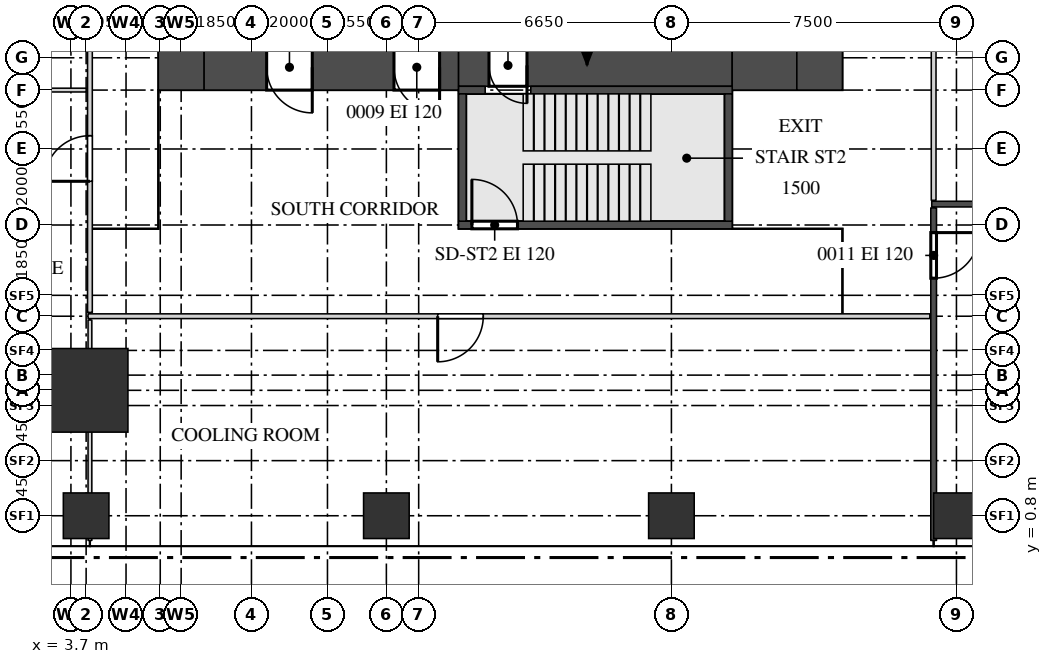
"""IFC4 building model, lengths in metres.
Left out: names, types, materials, properties, quantities, classifications, styles, units other than length and angle.
Written with IfcOpenShell. Run it as: python <this file> out.ifc"""

import sys

from ifc_helpers import new_model, si_unit, direction, frame, frame_2d, origin, origin_2d, place, context, subcontext, project, spatial, rectangle, extrude, source, transform, mapped, element, fill, save


model = new_model("IFC4")
c1 = context("Model", 3, precision=1e-05, world=origin(), true_north=direction((0.0, 1.0)))
c2 = subcontext(c1, "Body", "Model", "MODEL_VIEW")
j1 = project(units=[si_unit("LENGTHUNIT", "METRE"), si_unit("PLANEANGLEUNIT", "RADIAN")], contexts=[c1])
p1 = place(None, origin())
s1 = spatial("IfcSite", under=j1, at=p1, CompositionType="ELEMENT")
p2 = place(p1, origin())
s2 = spatial("IfcBuilding", under=s1, at=p2, CompositionType="ELEMENT")
p3 = place(p2, frame((0.0, 0.0, 73.5)))
s3 = spatial("IfcBuildingStorey", under=s2, at=p3, CompositionType="ELEMENT", Elevation=73.5)
m1 = source(origin(), c2, "Body", "SweptSolid", [
    extrude(rectangle(XDim=6.7, YDim=1.2, at=frame_2d((3.35, 0.0))), origin(), (0.0, 0.0, 1.0), 4.2),
])
p4 = place(p3, frame((7.2, 12.6, 0.0), z_axis=(0.0, 0.0, 1.0), x_axis=(1.0, 0.0, 0.0)))
e1 = element("IfcWall", 1, at=p4, inside=s3, PredefinedType="SHEAR", context=c2, shape_type="MappedRepresentation", body=[
    mapped(m1, transform((0.0, 0.0, 0.0))),
])
m2 = source(origin(), c2, "Body", "SweptSolid", [
    extrude(rectangle(XDim=1.2, YDim=2.1, at=frame_2d((0.6, 1.05))), frame((0.0, 0.61, 0.0), z_axis=(0.0, -1.0, 0.0), x_axis=(1.0, 0.0, 0.0)), (0.0, 0.0, 1.0), 1.22),
])
p5 = place(p4, frame((5.0, 0.0, 0.0)))
e2 = element("IfcOpeningElement", 2, at=p5, cuts=e1, PredefinedType="OPENING", context=c2, shape_type="MappedRepresentation", body=[
    mapped(m2, transform((0.0, 0.0, 0.0))),
])
p6 = place(p4, frame((1.65, 0.0, 0.0)))
e3 = element("IfcOpeningElement", 3, at=p6, cuts=e1, PredefinedType="OPENING", context=c2, shape_type="MappedRepresentation", body=[
    mapped(m2, transform((0.0, 0.0, 0.0))),
])
m3 = source(origin(), c2, "Body", "SweptSolid", [
    extrude(rectangle(XDim=7.2, YDim=1.1, at=frame_2d((3.6, 0.0))), origin(), (0.0, 0.0, 1.0), 4.2),
])
p7 = place(p3, frame((13.9, 12.65, 0.0), z_axis=(0.0, 0.0, 1.0), x_axis=(1.0, 0.0, 0.0)))
e4 = element("IfcWall", 4, at=p7, inside=s3, PredefinedType="SHEAR", context=c2, shape_type="MappedRepresentation", body=[
    mapped(m3, transform((0.0, 0.0, 0.0))),
])
m4 = source(origin(), c2, "Body", "SweptSolid", [
    extrude(rectangle(XDim=1.0, YDim=2.1, at=frame_2d((0.5, 1.05))), frame((0.0, 0.56, 0.0), z_axis=(0.0, -1.0, 0.0), x_axis=(1.0, 0.0, 0.0)), (0.0, 0.0, 1.0), 1.12),
])
p8 = place(p7, frame((0.8, 0.0, 0.0)))
e5 = element("IfcOpeningElement", 5, at=p8, cuts=e4, PredefinedType="OPENING", context=c2, shape_type="MappedRepresentation", body=[
    mapped(m4, transform((0.0, 0.0, 0.0))),
])
m5 = source(origin(), c2, "Body", "SweptSolid", [
    extrude(rectangle(XDim=1.7, YDim=1.2, at=frame_2d((0.85, 0.0))), origin(), (0.0, 0.0, 1.0), 4.2),
])
p9 = place(p3, frame((21.1, 12.6, 0.0), z_axis=(0.0, 0.0, 1.0), x_axis=(1.0, 0.0, 0.0)))
e6 = element("IfcWall", 6, at=p9, inside=s3, PredefinedType="SHEAR", context=c2, shape_type="MappedRepresentation", body=[
    mapped(m5, transform((0.0, 0.0, 0.0))),
])
m6 = source(origin(), c2, "Body", "SweptSolid", [
    extrude(rectangle(XDim=1.2, YDim=1.2, at=frame_2d((0.6, 0.0))), origin(), (0.0, 0.0, 1.0), 4.2),
])
for number, where, z_axis, x_axis in (
    (7, (22.8, 12.6, 0.0), (0.0, 0.0, 1.0), (1.0, 0.0, 0.0)),
    (8, (6.0, 12.6, 0.0), (0.0, 0.0, 1.0), (1.0, 0.0, 0.0)),
):
    element("IfcWall", number, at=place(p3, frame(where, z_axis=z_axis, x_axis=x_axis)), inside=s3, PredefinedType="SHEAR", context=c2, shape_type="MappedRepresentation", body=[
        mapped(m6, transform((0.0, 0.0, 0.0))),
    ])
m7 = source(origin(), c2, "Body", "SweptSolid", [
    extrude(rectangle(XDim=0.7, YDim=0.2, at=frame_2d((0.35, 0.0))), origin(), (0.0, 0.0, 1.0), 4.2),
])
p10 = place(p3, frame((13.9, 12.0, 0.0), z_axis=(0.0, 0.0, 1.0), x_axis=(1.0, 0.0, 0.0)))
e9 = element("IfcWall", 9, at=p10, inside=s3, PredefinedType="SHEAR", context=c2, shape_type="MappedRepresentation", body=[
    mapped(m7, transform((0.0, 0.0, 0.0))),
])
m8 = source(origin(), c2, "Body", "SweptSolid", [
    extrude(rectangle(XDim=5.3, YDim=0.2, at=frame_2d((2.65, 0.0))), origin(), (0.0, 0.0, 1.0), 4.2),
])
p11 = place(p3, frame((15.8, 12.0, 0.0), z_axis=(0.0, 0.0, 1.0), x_axis=(1.0, 0.0, 0.0)))
e10 = element("IfcWall", 10, at=p11, inside=s3, PredefinedType="SHEAR", context=c2, shape_type="MappedRepresentation", body=[
    mapped(m8, transform((0.0, 0.0, 0.0))),
])
m9 = source(origin(), c2, "Body", "SweptSolid", [
    extrude(rectangle(XDim=7.2, YDim=0.2, at=frame_2d((3.6, 0.0))), origin(), (0.0, 0.0, 1.0), 4.2),
])
p12 = place(p3, frame((13.9, 8.45, 0.0), z_axis=(0.0, 0.0, 1.0), x_axis=(1.0, 0.0, 0.0)))
e11 = element("IfcWall", 11, at=p12, inside=s3, PredefinedType="SHEAR", context=c2, shape_type="MappedRepresentation", body=[
    mapped(m9, transform((0.0, 0.0, 0.0))),
])
m10 = source(origin(), c2, "Body", "SweptSolid", [
    extrude(rectangle(XDim=1.2, YDim=2.1, at=frame_2d((0.6, 1.05))), frame((0.0, 0.11, 0.0), z_axis=(0.0, -1.0, 0.0), x_axis=(1.0, 0.0, 0.0)), (0.0, 0.0, 1.0), 0.22),
])
p13 = place(p12, frame((0.35, 0.0, 0.0)))
e12 = element("IfcOpeningElement", 12, at=p13, cuts=e11, PredefinedType="OPENING", context=c2, shape_type="MappedRepresentation", body=[
    mapped(m10, transform((0.0, 0.0, 0.0))),
])
m11 = source(origin(), c2, "Body", "SweptSolid", [
    extrude(rectangle(XDim=3.35, YDim=0.2, at=frame_2d((1.675, 0.0))), origin(), (0.0, 0.0, 1.0), 4.2),
])
for number, where, z_axis, x_axis in (
    (13, (21.0, 8.55, 0.0), (0.0, 0.0, 1.0), (0.0, 1.0, 0.0)),
    (14, (14.0, 8.55, 0.0), (0.0, 0.0, 1.0), (0.0, 1.0, 0.0)),
):
    element("IfcWall", number, at=place(p3, frame(where, z_axis=z_axis, x_axis=x_axis)), inside=s3, PredefinedType="SHEAR", context=c2, shape_type="MappedRepresentation", body=[
        mapped(m11, transform((0.0, 0.0, 0.0))),
    ])
m12 = source(origin(), c2, "Body", "SweptSolid", [
    extrude(rectangle(XDim=2.2, YDim=2.2, at=origin_2d()), origin(), (0.0, 0.0, 1.0), 4.5),
])
p14 = place(p3, frame((4.1, 4.1, 0.0), z_axis=(0.0, 0.0, 1.0), x_axis=(1.0, 0.0, 0.0)))
e15 = element("IfcColumn", 15, at=p14, inside=s3, PredefinedType="COLUMN", context=c2, shape_type="MappedRepresentation", body=[
    mapped(m12, transform((0.0, 0.0, 0.0))),
])
m13 = source(origin(), c2, "Body", "SweptSolid", [
    extrude(rectangle(XDim=1.2, YDim=1.2, at=origin_2d()), origin(), (0.0, 0.0, 1.0), 4.2),
])
for number, where, z_axis, x_axis in (
    (16, (4.1, 0.8, 0.0), (0.0, 0.0, 1.0), (1.0, 0.0, 0.0)),
    (17, (12.0, 0.8, 0.0), (0.0, 0.0, 1.0), (1.0, 0.0, 0.0)),
    (18, (19.5, 0.8, 0.0), (0.0, 0.0, 1.0), (1.0, 0.0, 0.0)),
    (19, (27.0, 0.8, 0.0), (0.0, 0.0, 1.0), (1.0, 0.0, 0.0)),
):
    element("IfcColumn", number, at=place(p3, frame(where, z_axis=z_axis, x_axis=x_axis)), inside=s3, PredefinedType="COLUMN", context=c2, shape_type="MappedRepresentation", body=[
        mapped(m13, transform((0.0, 0.0, 0.0))),
    ])
m14 = source(origin(), c2, "Body", "SweptSolid", [
    extrude(rectangle(XDim=5.8, YDim=0.1, at=frame_2d((2.9, 0.0))), origin(), (0.0, 0.0, 1.0), 3.6),
])
p15 = place(p3, frame((4.2, 0.15, 0.0), z_axis=(0.0, 0.0, 1.0), x_axis=(0.0, 1.0, 0.0)))
e20 = element("IfcWall", 20, at=p15, inside=s3, PredefinedType="PARTITIONING", context=c2, shape_type="MappedRepresentation", body=[
    mapped(m14, transform((0.0, 0.0, 0.0))),
])
m15 = source(origin(), c2, "Body", "SweptSolid", [
    extrude(rectangle(XDim=8.75, YDim=0.15, at=frame_2d((4.375, 0.0))), origin(), (0.0, 0.0, 1.0), 4.3),
])
p16 = place(p3, frame((26.4, 0.15, 0.0), z_axis=(0.0, 0.0, 1.0), x_axis=(0.0, 1.0, 0.0)))
e21 = element("IfcWall", 21, at=p16, inside=s3, PredefinedType="PARTITIONING", context=c2, shape_type="MappedRepresentation", body=[
    mapped(m15, transform((0.0, 0.0, 0.0))),
])
m16 = source(origin(), c2, "Body", "SweptSolid", [
    extrude(rectangle(XDim=1.2, YDim=2.1, at=frame_2d((0.6, 1.05))), frame((0.0, 0.085, 0.0), z_axis=(0.0, -1.0, 0.0), x_axis=(1.0, 0.0, 0.0)), (0.0, 0.0, 1.0), 0.17),
])
p17 = place(p16, frame((6.9, 0.0, 0.0)))
e22 = element("IfcOpeningElement", 22, at=p17, cuts=e21, PredefinedType="OPENING", context=c2, shape_type="MappedRepresentation", body=[
    mapped(m16, transform((0.0, 0.0, 0.0))),
])
m17 = source(origin(), c2, "Body", "SweptSolid", [
    extrude(rectangle(XDim=22.15, YDim=0.125, at=frame_2d((11.075, 0.0))), origin(), (0.0, 0.0, 1.0), 4.3),
])
p18 = place(p3, frame((4.15, 6.05, 0.0), z_axis=(0.0, 0.0, 1.0), x_axis=(1.0, 0.0, 0.0)))
e23 = element("IfcWall", 23, at=p18, inside=s3, PredefinedType="PARTITIONING", context=c2, shape_type="MappedRepresentation", body=[
    mapped(m17, transform((0.0, 0.0, 0.0))),
])
m18 = source(origin(), c2, "Body", "SweptSolid", [
    extrude(rectangle(XDim=1.2, YDim=2.1, at=frame_2d((0.6, 1.05))), frame((0.0, 0.073, 0.0), z_axis=(0.0, -1.0, 0.0), x_axis=(1.0, 0.0, 0.0)), (0.0, 0.0, 1.0), 0.145),
])
p19 = place(p18, frame((9.2, 0.0, 0.0)))
e24 = element("IfcOpeningElement", 24, at=p19, cuts=e23, PredefinedType="OPENING", context=c2, shape_type="MappedRepresentation", body=[
    mapped(m18, transform((0.0, 0.0, 0.0))),
])
m19 = source(origin(), c2, "Body", "SweptSolid", [
    extrude(rectangle(XDim=41.8, YDim=0.125, at=frame_2d((20.9, 0.0))), origin(), (0.0, 0.0, 1.0), 4.3),
])
p20 = place(p3, frame((4.2, 6.15, 0.0), z_axis=(0.0, 0.0, 1.0), x_axis=(0.0, 1.0, 0.0)))
e25 = element("IfcWall", 25, at=p20, inside=s3, PredefinedType="PARTITIONING", context=c2, shape_type="MappedRepresentation", body=[
    mapped(m19, transform((0.0, 0.0, 0.0))),
])
p21 = place(p20, frame((3.45, 0.0, 0.0)))
e26 = element("IfcOpeningElement", 26, at=p21, cuts=e25, PredefinedType="OPENING", context=c2, shape_type="MappedRepresentation", body=[
    mapped(m18, transform((0.0, 0.0, 0.0))),
])
m20 = source(origin(), c2, "Body", "SweptSolid", [
    extrude(rectangle(XDim=0.9, YDim=2.1, at=frame_2d((0.45, 1.05))), frame((0.0, 0.073, 0.0), z_axis=(0.0, -1.0, 0.0), x_axis=(1.0, 0.0, 0.0)), (0.0, 0.0, 1.0), 0.145),
])
p22 = place(p20, frame((13.25, 0.0, 0.0)))
e27 = element("IfcOpeningElement", 27, at=p22, cuts=e25, PredefinedType="OPENING", context=c2, shape_type="MappedRepresentation", body=[
    mapped(m20, transform((0.0, 0.0, 0.0))),
])
p23 = place(p20, frame((30.35, 0.0, 0.0)))
e28 = element("IfcOpeningElement", 28, at=p23, cuts=e25, PredefinedType="OPENING", context=c2, shape_type="MappedRepresentation", body=[
    mapped(m20, transform((0.0, 0.0, 0.0))),
])
m21 = source(origin(), c2, "Body", "SweptSolid", [
    extrude(rectangle(XDim=27.5, YDim=0.15, at=frame_2d((13.75, 0.0))), origin(), (0.0, 0.0, 1.0), 4.3),
])
p24 = place(p3, frame((26.35, 9.0, 0.0), z_axis=(0.0, 0.0, 1.0), x_axis=(1.0, 0.0, 0.0)))
e29 = element("IfcWall", 29, at=p24, inside=s3, PredefinedType="PARTITIONING", context=c2, shape_type="MappedRepresentation", body=[
    mapped(m21, transform((0.0, 0.0, 0.0))),
])
m22 = source(origin(), c2, "Body", "SweptSolid", [
    extrude(rectangle(XDim=26.1, YDim=0.125, at=frame_2d((13.05, 0.0))), origin(), (0.0, 0.0, 1.0), 4.3),
])
p25 = place(p3, frame((26.4, 9.1, 0.0), z_axis=(0.0, 0.0, 1.0), x_axis=(0.0, 1.0, 0.0)))
e30 = element("IfcWall", 30, at=p25, inside=s3, PredefinedType="PARTITIONING", context=c2, shape_type="MappedRepresentation", body=[
    mapped(m22, transform((0.0, 0.0, 0.0))),
])
p26 = place(p25, frame((5.8, 0.0, 0.0)))
e31 = element("IfcOpeningElement", 31, at=p26, cuts=e30, PredefinedType="OPENING", context=c2, shape_type="MappedRepresentation", body=[
    mapped(m18, transform((0.0, 0.0, 0.0))),
])
m23 = source(origin(), c2, "Body", "SweptSolid", [
    extrude(rectangle(XDim=3.95, YDim=0.1, at=frame_2d((1.975, 0.0))), origin(), (0.0, 0.0, 1.0), 4.3),
])
p27 = place(p3, frame((0.15, 12.0, 0.0), z_axis=(0.0, 0.0, 1.0), x_axis=(1.0, 0.0, 0.0)))
e32 = element("IfcWall", 32, at=p27, inside=s3, PredefinedType="PARTITIONING", context=c2, shape_type="MappedRepresentation", body=[
    mapped(m23, transform((0.0, 0.0, 0.0))),
])
m24 = source(origin(), c2, "Body", "SweptSolid", [
    extrude(rectangle(XDim=1.2, YDim=2.1, at=frame_2d((0.6, 1.05))), frame((0.0, 0.55, 0.0), z_axis=(0.0, -1.0, 0.0), x_axis=(1.0, 0.0, 0.0)), (0.0, 0.0, 1.0), 1.1),
])
p28 = place(p5, origin())
e33 = element("IfcDoor", 33, at=p28, inside=s3, OperationType="SINGLE_SWING_RIGHT", PredefinedType="DOOR", context=c2, shape_type="MappedRepresentation", body=[
    mapped(m24, transform((0.0, 0.0, 0.0))),
])
fill(e2, e33)
p29 = place(p6, origin())
e34 = element("IfcDoor", 34, at=p29, inside=s3, OperationType="SINGLE_SWING_RIGHT", PredefinedType="DOOR", context=c2, shape_type="MappedRepresentation", body=[
    mapped(m24, transform((0.0, 0.0, 0.0))),
])
fill(e3, e34)
m25 = source(origin(), c2, "Body", "SweptSolid", [
    extrude(rectangle(XDim=1.0, YDim=2.1, at=frame_2d((0.5, 1.05))), frame((0.0, 0.5, 0.0), z_axis=(0.0, -1.0, 0.0), x_axis=(1.0, 0.0, 0.0)), (0.0, 0.0, 1.0), 1.0),
])
p30 = place(p8, origin())
e35 = element("IfcDoor", 35, at=p30, inside=s3, OperationType="SINGLE_SWING_RIGHT", PredefinedType="DOOR", context=c2, shape_type="MappedRepresentation", body=[
    mapped(m25, transform((0.0, 0.0, 0.0))),
])
fill(e5, e35)
m26 = source(origin(), c2, "Body", "SweptSolid", [
    extrude(rectangle(XDim=1.2, YDim=2.1, at=frame_2d((0.6, 1.05))), frame((0.0, 0.025, 0.0), z_axis=(0.0, -1.0, 0.0), x_axis=(1.0, 0.0, 0.0)), (0.0, 0.0, 1.0), 0.05),
])
p31 = place(p17, origin())
e36 = element("IfcDoor", 36, at=p31, inside=s3, OperationType="SINGLE_SWING_RIGHT", PredefinedType="DOOR", context=c2, shape_type="MappedRepresentation", body=[
    mapped(m26, transform((0.0, 0.0, 0.0))),
])
fill(e22, e36)
p32 = place(p21, origin())
e37 = element("IfcDoor", 37, at=p32, inside=s3, OperationType="SINGLE_SWING_RIGHT", PredefinedType="DOOR", context=c2, shape_type="MappedRepresentation", body=[
    mapped(m26, transform((0.0, 0.0, 0.0))),
])
fill(e26, e37)
p33 = place(p19, origin())
e38 = element("IfcDoor", 38, at=p33, inside=s3, OperationType="SINGLE_SWING_LEFT", PredefinedType="DOOR", context=c2, shape_type="MappedRepresentation", body=[
    mapped(m26, transform((0.0, 0.0, 0.0))),
])
fill(e24, e38)
p34 = place(p13, origin())
e39 = element("IfcDoor", 39, at=p34, inside=s3, OperationType="SINGLE_SWING_RIGHT", PredefinedType="DOOR", context=c2, shape_type="MappedRepresentation", body=[
    mapped(m26, transform((0.0, 0.0, 0.0))),
])
fill(e12, e39)
save(model, sys.argv[1])
